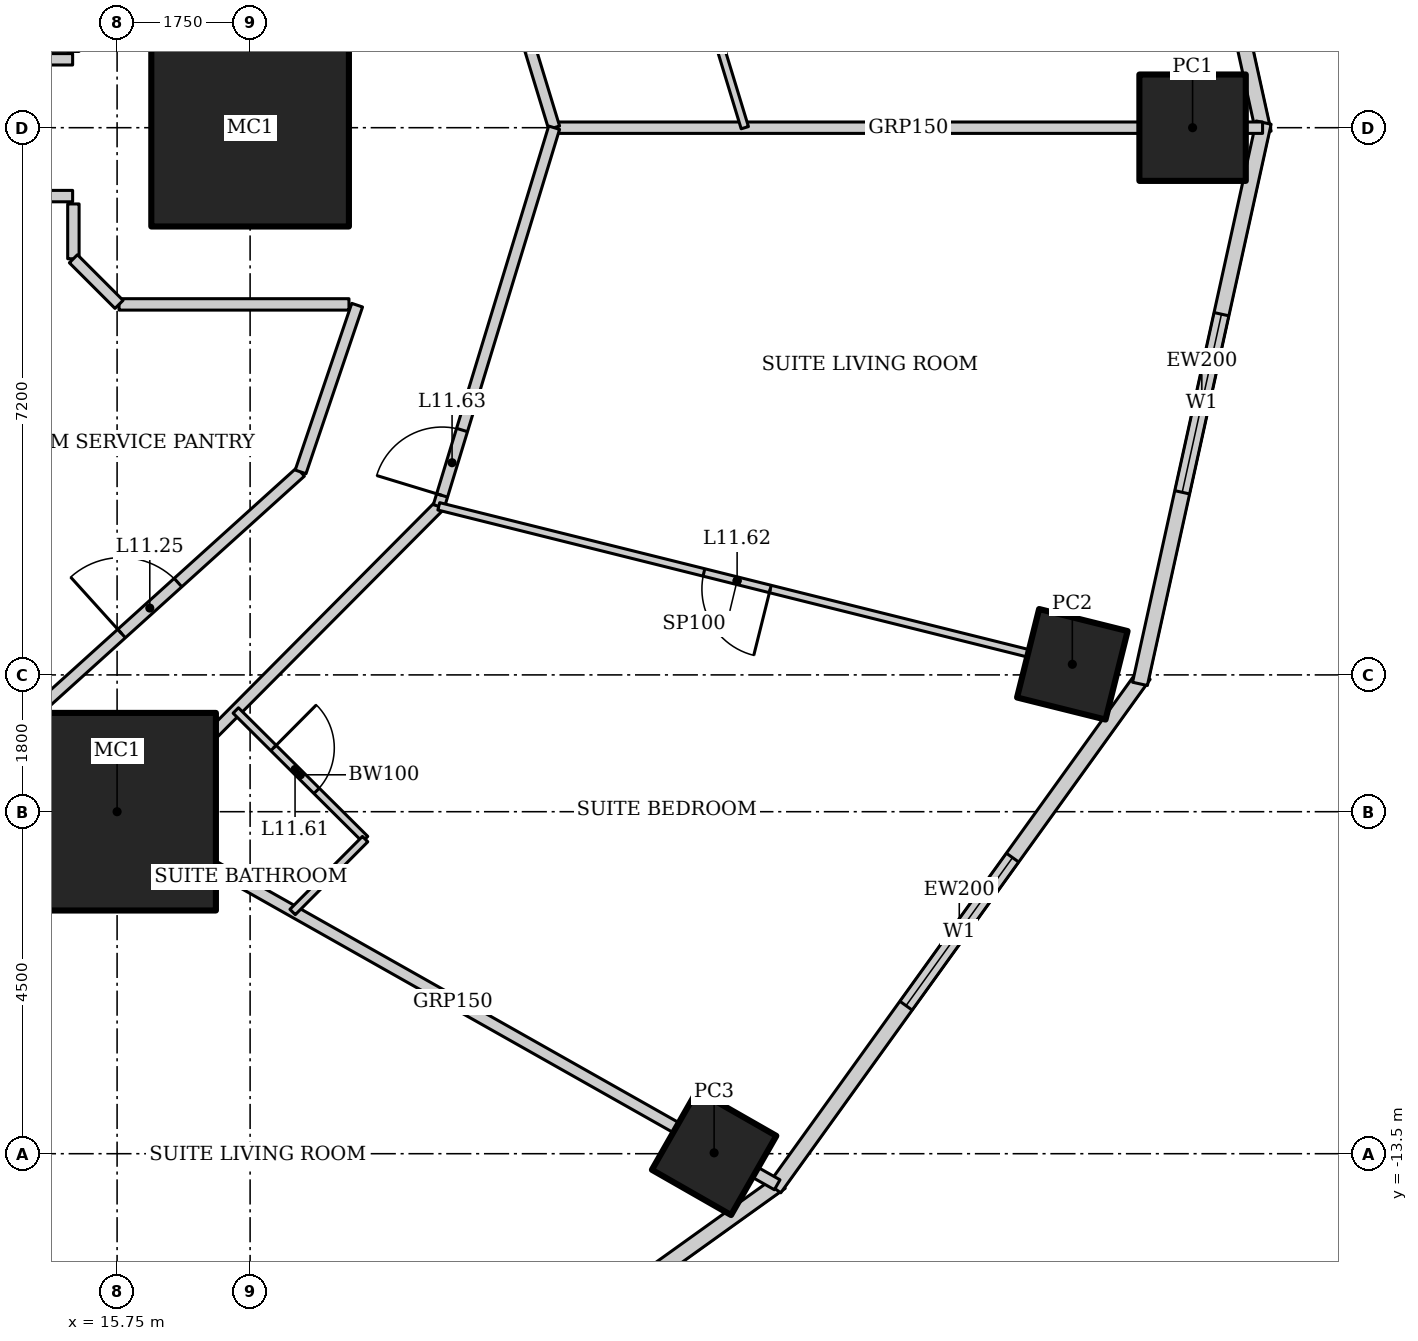
"""IFC4 building model, lengths in metres.
Left out: names, types, materials, properties, quantities, classifications, styles, units other than length and angle.
Written with IfcOpenShell. Run it as: python <this file> out.ifc"""

import sys

from ifc_helpers import new_model, si_unit, direction, frame, frame_2d, origin, origin_2d, place, context, subcontext, project, spatial, rectangle, hollow_rectangle, extrude, element, fill, save


model = new_model("IFC4")
c1 = context("Model", 3, precision=1e-05, world=origin(), true_north=direction((0.0, 1.0)))
c2 = subcontext(c1, "Body", "Model", "MODEL_VIEW")
j1 = project(units=[si_unit("LENGTHUNIT", "METRE"), si_unit("PLANEANGLEUNIT", "RADIAN")], contexts=[c1])
p1 = place(None, origin())
s1 = spatial("IfcSite", under=j1, at=p1, CompositionType="ELEMENT")
p2 = place(p1, origin())
s2 = spatial("IfcBuilding", under=s1, at=p2, CompositionType="ELEMENT")
p3 = place(p2, frame((0.0, 0.0, 55.0)))
s3 = spatial("IfcBuildingStorey", under=s2, at=p3, CompositionType="ELEMENT", Elevation=55.0)
for number, where, z_axis, x_axis in (
    (1, (17.5, 0.0, 0.0), (0.0, 0.0, 1.0), (1.0, 0.0, 0.0)),
    (2, (15.75, -9.0, 0.0), (0.0, 0.0, 1.0), (1.0, 0.0, 0.0)),
):
    element("IfcColumn", number, at=place(p3, frame(where, z_axis=z_axis, x_axis=x_axis)), inside=s3, PredefinedType="COLUMN", context=c2, shape_type="SweptSolid", body=[
        extrude(hollow_rectangle(XDim=2.6, YDim=2.6, WallThickness=0.13, at=origin_2d()), origin(), (0.0, 0.0, 1.0), 3.6),
    ])
p4 = place(p3, frame((29.9, 0.0, 0.0), z_axis=(0.0, 0.0, 1.0), x_axis=(1.0, 0.0, 0.0)))
e3 = element("IfcColumn", 3, at=p4, inside=s3, PredefinedType="COLUMN", context=c2, shape_type="SweptSolid", body=[
    extrude(hollow_rectangle(XDim=1.4, YDim=1.4, WallThickness=0.1, at=origin_2d()), origin(), (0.0, 0.0, 1.0), 3.6),
])
p5 = place(p3, frame((23.605, -13.489, 0.0), z_axis=(0.0, 0.0, 1.0), x_axis=(0.496139221777, 0.86824298017, 0.0)))
e4 = element("IfcColumn", 4, at=p5, inside=s3, PredefinedType="COLUMN", context=c2, shape_type="SweptSolid", body=[
    extrude(hollow_rectangle(XDim=1.2, YDim=1.2, WallThickness=0.12, at=origin_2d()), origin(), (0.0, 0.0, 1.0), 3.6),
])
p6 = place(p3, frame((28.318, -7.06, 0.0), z_axis=(0.0, 0.0, 1.0), x_axis=(0.2419218956, 0.970295726276, 0.0)))
e5 = element("IfcColumn", 5, at=p6, inside=s3, PredefinedType="COLUMN", context=c2, shape_type="SweptSolid", body=[
    extrude(hollow_rectangle(XDim=1.2, YDim=1.2, WallThickness=0.1, at=origin_2d()), origin(), (0.0, 0.0, 1.0), 3.6),
])
p7 = place(p3, frame((30.835, -0.067, 0.0), z_axis=(0.0, 0.0, 1.0), x_axis=(-0.215238065514, 0.976561608478, 0.0)))
e6 = element("IfcWall", 6, at=p7, inside=s3, PredefinedType="SOLIDWALL", context=c2, shape_type="SweptSolid", body=[
    extrude(rectangle(XDim=7.562, YDim=0.2, at=frame_2d((3.781, 0.0))), origin(), (0.0, 0.0, 1.0), 3.45),
])
p8 = place(p7, frame((2.581, 0.0, 0.5)))
e7 = element("IfcOpeningElement", 7, at=p8, cuts=e6, PredefinedType="OPENING", context=c2, shape_type="SweptSolid", body=[
    extrude(rectangle(XDim=2.4, YDim=2.2, at=frame_2d((1.2, 1.1))), frame((0.0, 0.11, 0.0), z_axis=(0.0, -1.0, 0.0), x_axis=(1.0, 0.0, 0.0)), (0.0, 0.0, 1.0), 0.22),
])
p9 = place(p3, frame((17.929, -18.572, 0.0), z_axis=(0.0, 0.0, 1.0), x_axis=(0.812791321576, 0.582554948112, 0.0)))
e8 = element("IfcWall", 8, at=p9, inside=s3, PredefinedType="SOLIDWALL", context=c2, shape_type="SweptSolid", body=[
    extrude(rectangle(XDim=8.063, YDim=0.2, at=frame_2d((4.032, 0.0))), origin(), (0.0, 0.0, 1.0), 3.45),
])
p10 = place(p9, frame((2.832, 0.0, 0.5)))
e9 = element("IfcOpeningElement", 9, at=p10, cuts=e8, PredefinedType="OPENING", context=c2, shape_type="SweptSolid", body=[
    extrude(rectangle(XDim=2.4, YDim=2.2, at=frame_2d((1.2, 1.1))), frame((0.0, 0.11, 0.0), z_axis=(0.0, -1.0, 0.0), x_axis=(1.0, 0.0, 0.0)), (0.0, 0.0, 1.0), 0.22),
])
p11 = place(p3, frame((24.4, -13.957, 0.0), z_axis=(0.0, 0.0, 1.0), x_axis=(0.583937613703, 0.811798536155, 0.0)))
e10 = element("IfcWall", 10, at=p11, inside=s3, PredefinedType="SOLIDWALL", context=c2, shape_type="SweptSolid", body=[
    extrude(rectangle(XDim=8.323, YDim=0.2, at=frame_2d((4.162, 0.0))), origin(), (0.0, 0.0, 1.0), 3.45),
])
p12 = place(p11, frame((2.961, 0.0, 0.5)))
e11 = element("IfcOpeningElement", 11, at=p12, cuts=e10, PredefinedType="OPENING", context=c2, shape_type="SweptSolid", body=[
    extrude(rectangle(XDim=2.4, YDim=2.2, at=frame_2d((1.2, 1.1))), frame((0.0, 0.11, 0.0), z_axis=(0.0, -1.0, 0.0), x_axis=(1.0, 0.0, 0.0)), (0.0, 0.0, 1.0), 0.22),
])
p13 = place(p3, frame((29.208, -7.318, 0.0), z_axis=(0.0, 0.0, 1.0), x_axis=(0.215238065514, 0.976561608478, 0.0)))
e12 = element("IfcWall", 12, at=p13, inside=s3, PredefinedType="SOLIDWALL", context=c2, shape_type="SweptSolid", body=[
    extrude(rectangle(XDim=7.562, YDim=0.2, at=frame_2d((3.781, 0.0))), origin(), (0.0, 0.0, 1.0), 3.45),
])
p14 = place(p13, frame((2.581, 0.0, 0.5)))
e13 = element("IfcOpeningElement", 13, at=p14, cuts=e12, PredefinedType="OPENING", context=c2, shape_type="SweptSolid", body=[
    extrude(rectangle(XDim=2.4, YDim=2.2, at=frame_2d((1.2, 1.1))), frame((0.0, 0.11, 0.0), z_axis=(0.0, -1.0, 0.0), x_axis=(1.0, 0.0, 0.0)), (0.0, 0.0, 1.0), 0.22),
])
p15 = place(p3, frame((30.821, 0.0, 0.0), z_axis=(0.0, 0.0, 1.0), x_axis=(-1.0, 0.0, 0.0)))
e14 = element("IfcWall", 14, at=p15, inside=s3, PredefinedType="PARTITIONING", context=c2, shape_type="SweptSolid", body=[
    extrude(rectangle(XDim=9.321, YDim=0.15, at=frame_2d((4.66, 0.0))), origin(), (0.0, 0.0, 1.0), 2.528),
])
p16 = place(p3, frame((24.435, -13.909, 0.0), z_axis=(0.0, 0.0, 1.0), x_axis=(-0.870612006791, 0.491970256856, 0.0)))
e15 = element("IfcWall", 15, at=p16, inside=s3, PredefinedType="PARTITIONING", context=c2, shape_type="SweptSolid", body=[
    extrude(rectangle(XDim=9.802, YDim=0.15, at=frame_2d((4.901, 0.0))), origin(), (0.0, 0.0, 1.0), 2.693),
])
p17 = place(p3, frame((21.5, 0.0, 0.0), z_axis=(0.0, 0.0, 1.0), x_axis=(-0.291383581394, 0.95660629754, 0.0)))
e16 = element("IfcWall", 16, at=p17, inside=s3, PredefinedType="PARTITIONING", context=c2, shape_type="SweptSolid", body=[
    extrude(rectangle(XDim=5.208, YDim=0.15, at=frame_2d((2.604, 0.0))), origin(), (0.0, 0.0, 1.0), 3.45),
])
p18 = place(p3, frame((11.147, -11.544, 0.0), z_axis=(0.0, 0.0, 1.0), x_axis=(0.888333171507, 0.459199495209, 0.0)))
e17 = element("IfcWall", 17, at=p18, inside=s3, PredefinedType="PARTITIONING", context=c2, shape_type="SweptSolid", body=[
    extrude(rectangle(XDim=5.351, YDim=0.15, at=frame_2d((2.676, 0.0))), origin(), (0.0, 0.0, 1.0), 3.45),
])
p19 = place(p18, frame((0.15, 0.0, 0.0)))
e18 = element("IfcOpeningElement", 18, at=p19, cuts=e17, PredefinedType="OPENING", context=c2, shape_type="SweptSolid", body=[
    extrude(rectangle(XDim=0.9, YDim=2.1, at=frame_2d((0.45, 1.05))), frame((0.0, 0.085, 0.0), z_axis=(0.0, -1.0, 0.0), x_axis=(1.0, 0.0, 0.0)), (0.0, 0.0, 1.0), 0.17),
])
p20 = place(p3, frame((15.901, -9.086, 0.0), z_axis=(0.0, 0.0, 1.0), x_axis=(0.705121546414, 0.709086457904, 0.0)))
e19 = element("IfcWall", 19, at=p20, inside=s3, PredefinedType="PARTITIONING", context=c2, shape_type="SweptSolid", body=[
    extrude(rectangle(XDim=5.788, YDim=0.15, at=frame_2d((2.894, 0.0))), origin(), (0.0, 0.0, 1.0), 3.45),
])
p21 = place(p3, frame((19.982, -4.982, 0.0), z_axis=(0.0, 0.0, 1.0), x_axis=(0.291383581394, 0.95660629754, 0.0)))
e20 = element("IfcWall", 20, at=p21, inside=s3, PredefinedType="PARTITIONING", context=c2, shape_type="SweptSolid", body=[
    extrude(rectangle(XDim=5.208, YDim=0.15, at=frame_2d((2.604, 0.0))), origin(), (0.0, 0.0, 1.0), 3.45),
])
p22 = place(p21, frame((0.15, 0.0, 0.0)))
e21 = element("IfcOpeningElement", 21, at=p22, cuts=e20, PredefinedType="OPENING", context=c2, shape_type="SweptSolid", body=[
    extrude(rectangle(XDim=0.9, YDim=2.1, at=frame_2d((0.45, 1.05))), frame((0.0, 0.085, 0.0), z_axis=(0.0, -1.0, 0.0), x_axis=(1.0, 0.0, 0.0)), (0.0, 0.0, 1.0), 0.17),
])
p23 = place(p3, frame((14.196, -8.112, 0.0), z_axis=(0.0, 0.0, 1.0), x_axis=(0.742194222, 0.670184852731, 0.0)))
e22 = element("IfcWall", 22, at=p23, inside=s3, PredefinedType="PARTITIONING", context=c2, shape_type="SweptSolid", body=[
    extrude(rectangle(XDim=5.347, YDim=0.15, at=frame_2d((2.673, 0.0))), origin(), (0.0, 0.0, 1.0), 3.45),
])
p24 = place(p23, frame((2.173, 0.0, 0.0)))
e23 = element("IfcOpeningElement", 23, at=p24, cuts=e22, PredefinedType="OPENING", context=c2, shape_type="SweptSolid", body=[
    extrude(rectangle(XDim=1.0, YDim=2.1, at=frame_2d((0.5, 1.05))), frame((0.0, 0.085, 0.0), z_axis=(0.0, -1.0, 0.0), x_axis=(1.0, 0.0, 0.0)), (0.0, 0.0, 1.0), 0.17),
])
p25 = place(p3, frame((23.213, 2.613, 0.0), z_axis=(0.0, 0.0, 1.0), x_axis=(0.291339473488, -0.956619731757, 0.0)))
e24 = element("IfcWall", 24, at=p25, inside=s3, PredefinedType="PARTITIONING", context=c2, shape_type="SweptSolid", body=[
    extrude(rectangle(XDim=2.731, YDim=0.1, at=frame_2d((1.365, 0.0))), origin(), (0.0, 0.0, 1.0), 3.45),
])
p26 = place(p3, frame((16.944, -17.545, 0.0), z_axis=(0.0, 0.0, 1.0), x_axis=(-0.694680670522, 0.71931826475, 0.0)))
e25 = element("IfcWall", 25, at=p26, inside=s3, PredefinedType="PARTITIONING", context=c2, shape_type="SweptSolid", body=[
    extrude(rectangle(XDim=8.344, YDim=0.1, at=frame_2d((4.172, 0.0))), origin(), (0.0, 0.0, 1.0), 2.528),
])
p27 = place(p26, frame((3.722, 0.0, 0.0)))
e26 = element("IfcOpeningElement", 26, at=p27, cuts=e25, PredefinedType="OPENING", context=c2, shape_type="SweptSolid", body=[
    extrude(rectangle(XDim=0.9, YDim=2.1, at=frame_2d((0.45, 1.05))), frame((0.0, 0.06, 0.0), z_axis=(0.0, -1.0, 0.0), x_axis=(1.0, 0.0, 0.0)), (0.0, 0.0, 1.0), 0.12),
])
p28 = place(p3, frame((17.311, -7.668, 0.0), z_axis=(0.0, 0.0, 1.0), x_axis=(0.709138392716, -0.705069315724, 0.0)))
e27 = element("IfcWall", 27, at=p28, inside=s3, PredefinedType="PARTITIONING", context=c2, shape_type="SweptSolid", body=[
    extrude(rectangle(XDim=2.4, YDim=0.1, at=frame_2d((1.2, 0.0))), origin(), (0.0, 0.0, 1.0), 3.45),
])
p29 = place(p28, frame((0.7, 0.0, 0.0)))
e28 = element("IfcOpeningElement", 28, at=p29, cuts=e27, PredefinedType="OPENING", context=c2, shape_type="SweptSolid", body=[
    extrude(rectangle(XDim=0.8, YDim=2.1, at=frame_2d((0.4, 1.05))), frame((0.0, 0.06, 0.0), z_axis=(0.0, -1.0, 0.0), x_axis=(1.0, 0.0, 0.0)), (0.0, 0.0, 1.0), 0.12),
])
p30 = place(p3, frame((19.013, -9.36, 0.0), z_axis=(0.0, 0.0, 1.0), x_axis=(-0.7051187611, -0.709089227633, 0.0)))
e29 = element("IfcWall", 29, at=p30, inside=s3, PredefinedType="PARTITIONING", context=c2, shape_type="SweptSolid", body=[
    extrude(rectangle(XDim=1.353, YDim=0.1, at=frame_2d((0.676, 0.0))), origin(), (0.0, 0.0, 1.0), 3.45),
])
p31 = place(p3, frame((27.833, -6.939, 0.0), z_axis=(0.0, 0.0, 1.0), x_axis=(-0.97029673161, 0.24191786339, 0.0)))
e30 = element("IfcWall", 30, at=p31, inside=s3, PredefinedType="PARTITIONING", context=c2, shape_type="SweptSolid", body=[
    extrude(rectangle(XDim=8.091, YDim=0.1, at=frame_2d((4.045, 0.0))), origin(), (0.0, 0.0, 1.0), 2.333),
])
p32 = place(p31, frame((3.595, 0.0, 0.0)))
e31 = element("IfcOpeningElement", 31, at=p32, cuts=e30, PredefinedType="OPENING", context=c2, shape_type="SweptSolid", body=[
    extrude(rectangle(XDim=0.9, YDim=2.1, at=frame_2d((0.45, 1.05))), frame((0.0, 0.06, 0.0), z_axis=(0.0, -1.0, 0.0), x_axis=(1.0, 0.0, 0.0)), (0.0, 0.0, 1.0), 0.12),
])
p33 = place(p3, frame((18.164, -4.529, 0.0), z_axis=(0.0, 0.0, 1.0), x_axis=(0.321124194945, 0.947037090837, 0.0)))
e32 = element("IfcWall", 32, at=p33, inside=s3, PredefinedType="PARTITIONING", context=c2, shape_type="SweptSolid", body=[
    extrude(rectangle(XDim=2.317, YDim=0.15, at=frame_2d((1.158, 0.0))), origin(), (0.0, 0.0, 1.0), 3.45),
])
for number, where, z_axis, x_axis in (
    (33, (14.2, -0.9, 0.0), (0.0, 0.0, 1.0), (1.0, 0.0, 0.0)),
    (34, (14.2, 0.9, 0.0), (0.0, 0.0, 1.0), (1.0, 0.0, 0.0)),
):
    element("IfcWall", number, at=place(p3, frame(where, z_axis=z_axis, x_axis=x_axis)), inside=s3, PredefinedType="PARTITIONING", context=c2, shape_type="SweptSolid", body=[
        extrude(rectangle(XDim=0.965, YDim=0.15, at=frame_2d((0.482, 0.0))), origin(), (0.0, 0.0, 1.0), 3.45),
    ])
p34 = place(p3, frame((15.175, -1.725, 0.0), z_axis=(0.0, 0.0, 1.0), x_axis=(0.0, 1.0, 0.0)))
e35 = element("IfcWall", 35, at=p34, inside=s3, PredefinedType="PARTITIONING", context=c2, shape_type="SweptSolid", body=[
    extrude(rectangle(XDim=0.721, YDim=0.15, at=frame_2d((0.361, 0.0))), origin(), (0.0, 0.0, 1.0), 3.45),
])
p35 = place(p3, frame((18.801, -2.325, 0.0), z_axis=(0.0, 0.0, 1.0), x_axis=(-1.0, 0.0, 0.0)))
e36 = element("IfcWall", 36, at=p35, inside=s3, PredefinedType="PARTITIONING", context=c2, shape_type="SweptSolid", body=[
    extrude(rectangle(XDim=3.025, YDim=0.15, at=frame_2d((1.513, 0.0))), origin(), (0.0, 0.0, 1.0), 3.45),
])
p36 = place(p3, frame((15.775, -2.325, 0.0), z_axis=(0.0, 0.0, 1.0), x_axis=(-0.707106781187, 0.707106781187, 0.0)))
e37 = element("IfcWall", 37, at=p36, inside=s3, PredefinedType="PARTITIONING", context=c2, shape_type="SweptSolid", body=[
    extrude(rectangle(XDim=0.849, YDim=0.15, at=frame_2d((0.425, 0.0))), origin(), (0.0, 0.0, 1.0), 3.45),
])
p37 = place(p12, origin())
e38 = element("IfcWindow", 38, at=p37, inside=s3, PartitioningType="SINGLE_PANEL", PredefinedType="WINDOW", context=c2, shape_type="SweptSolid", body=[
    extrude(rectangle(XDim=2.4, YDim=2.2, at=frame_2d((1.2, 1.1))), frame((0.0, 0.03, 0.0), z_axis=(0.0, -1.0, 0.0), x_axis=(1.0, 0.0, 0.0)), (0.0, 0.0, 1.0), 0.06),
])
fill(e11, e38)
p38 = place(p14, origin())
e39 = element("IfcWindow", 39, at=p38, inside=s3, PartitioningType="SINGLE_PANEL", PredefinedType="WINDOW", context=c2, shape_type="SweptSolid", body=[
    extrude(rectangle(XDim=2.4, YDim=2.2, at=frame_2d((1.2, 1.1))), frame((0.0, 0.03, 0.0), z_axis=(0.0, -1.0, 0.0), x_axis=(1.0, 0.0, 0.0)), (0.0, 0.0, 1.0), 0.06),
])
fill(e13, e39)
p39 = place(p24, origin())
e40 = element("IfcDoor", 40, at=p39, inside=s3, OperationType="SINGLE_SWING_LEFT", PredefinedType="DOOR", context=c2, shape_type="SweptSolid", body=[
    extrude(rectangle(XDim=1.0, YDim=2.1, at=frame_2d((0.5, 1.05))), frame((0.0, 0.025, 0.0), z_axis=(0.0, -1.0, 0.0), x_axis=(1.0, 0.0, 0.0)), (0.0, 0.0, 1.0), 0.05),
])
fill(e23, e40)
p40 = place(p29, origin())
e41 = element("IfcDoor", 41, at=p40, inside=s3, OperationType="SINGLE_SWING_LEFT", PredefinedType="DOOR", context=c2, shape_type="SweptSolid", body=[
    extrude(rectangle(XDim=0.8, YDim=2.1, at=frame_2d((0.4, 1.05))), frame((0.0, 0.025, 0.0), z_axis=(0.0, -1.0, 0.0), x_axis=(1.0, 0.0, 0.0)), (0.0, 0.0, 1.0), 0.05),
])
fill(e28, e41)
p41 = place(p32, origin())
e42 = element("IfcDoor", 42, at=p41, inside=s3, OperationType="SINGLE_SWING_LEFT", PredefinedType="DOOR", context=c2, shape_type="SweptSolid", body=[
    extrude(rectangle(XDim=0.9, YDim=2.1, at=frame_2d((0.45, 1.05))), frame((0.0, 0.025, 0.0), z_axis=(0.0, -1.0, 0.0), x_axis=(1.0, 0.0, 0.0)), (0.0, 0.0, 1.0), 0.05),
])
fill(e31, e42)
p42 = place(p22, origin())
e43 = element("IfcDoor", 43, at=p42, inside=s3, OperationType="SINGLE_SWING_LEFT", PredefinedType="DOOR", context=c2, shape_type="SweptSolid", body=[
    extrude(rectangle(XDim=0.9, YDim=2.1, at=frame_2d((0.45, 1.05))), frame((0.0, 0.025, 0.0), z_axis=(0.0, -1.0, 0.0), x_axis=(1.0, 0.0, 0.0)), (0.0, 0.0, 1.0), 0.05),
])
fill(e21, e43)
save(model, sys.argv[1])
